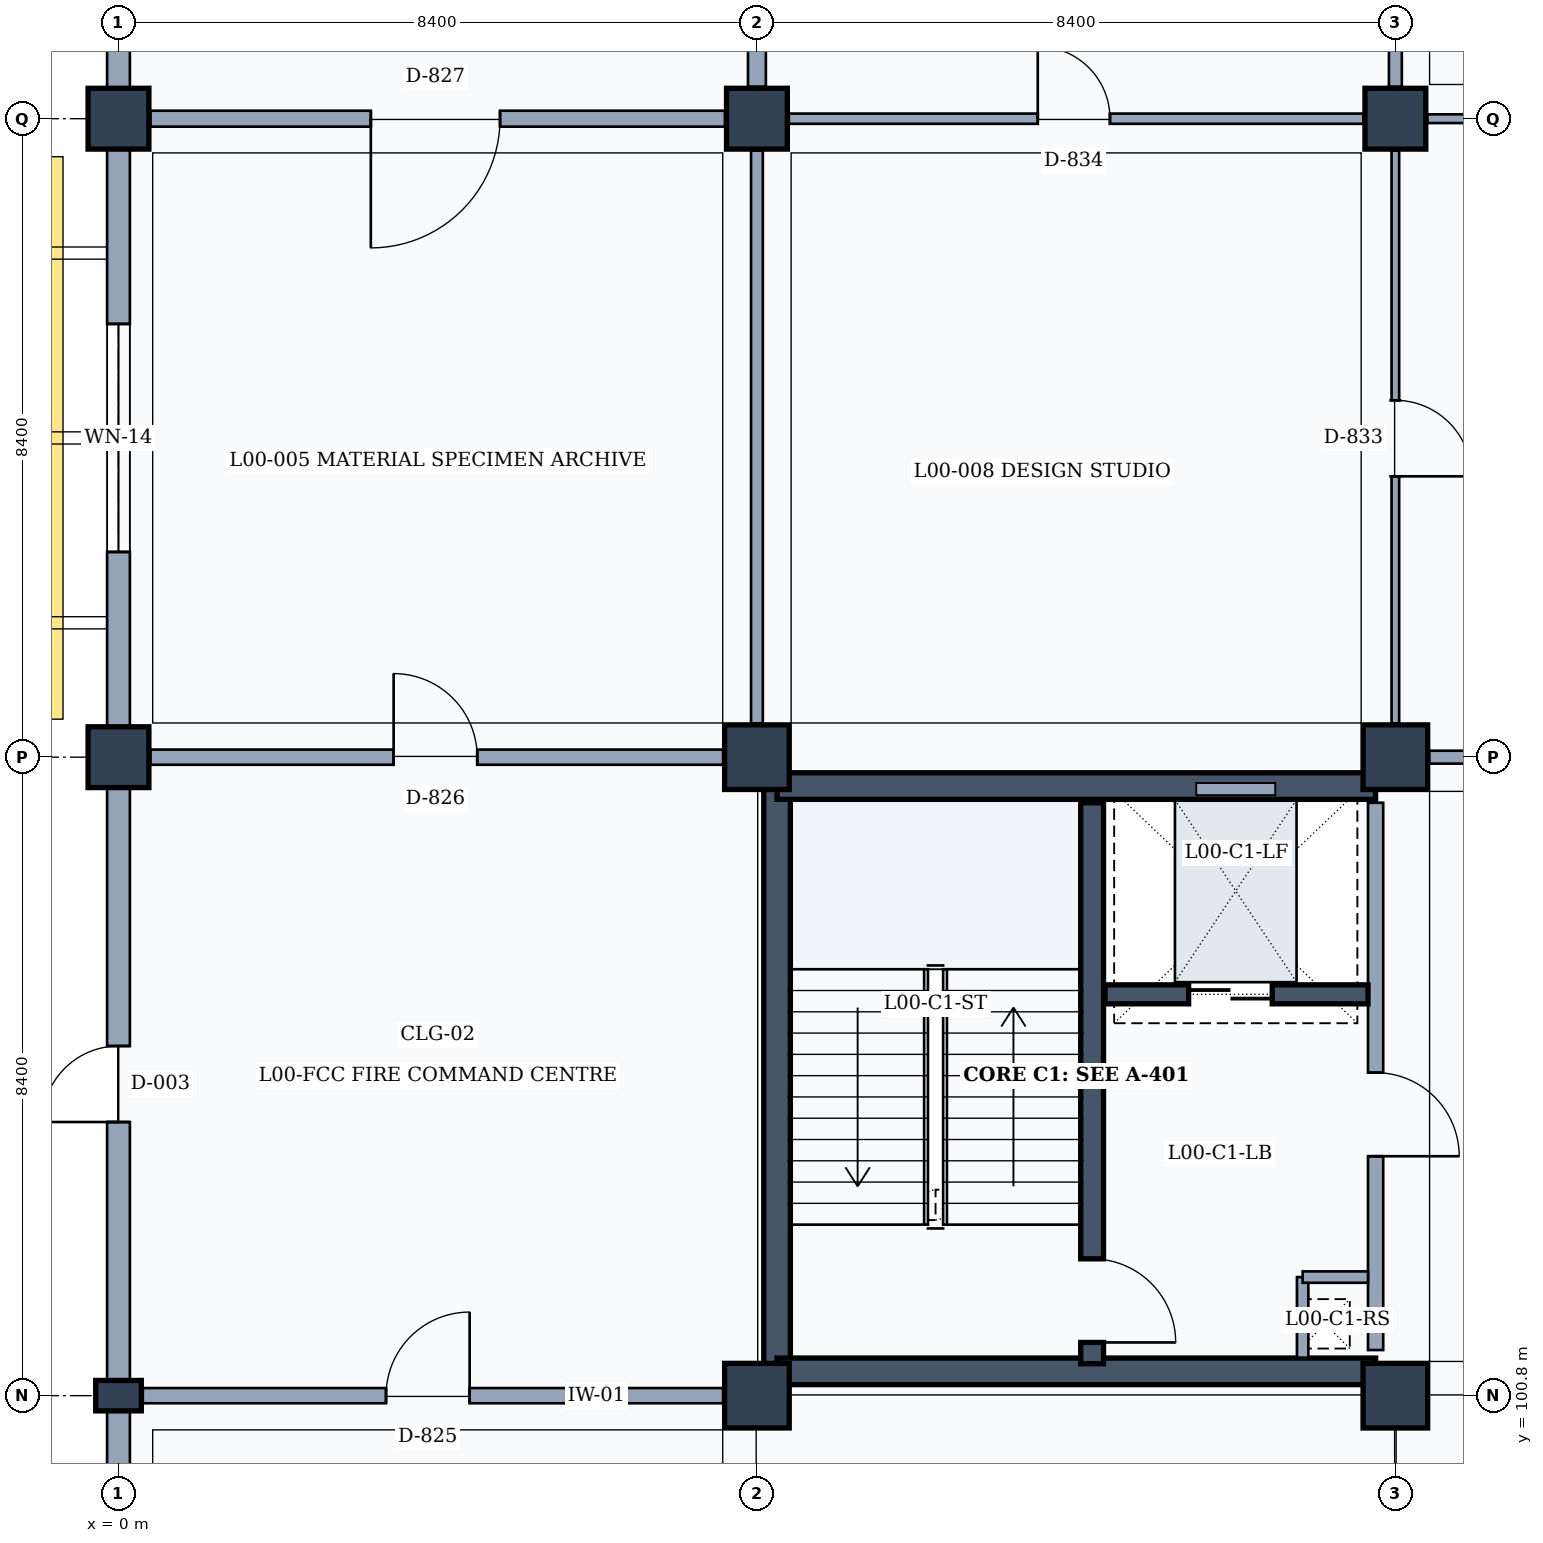
"""IFC4 building model, lengths in metres.
Left out: names, types, materials, properties, quantities, classifications, styles, units other than length and angle.
Written with IfcOpenShell. Run it as: python <this file> out.ifc"""

import sys

from ifc_helpers import new_model, si_unit, direction, frame, frame_2d, origin, origin_2d, place, context, subcontext, project, spatial, rectangle, extrude, element, fill, save


model = new_model("IFC4")
c1 = context("Model", 3, precision=1e-05, world=origin(), true_north=direction((0.0, 1.0)))
c2 = subcontext(c1, "Body", "Model", "MODEL_VIEW")
j1 = project(units=[si_unit("LENGTHUNIT", "METRE"), si_unit("PLANEANGLEUNIT", "RADIAN")], contexts=[c1])
p1 = place(None, origin())
s1 = spatial("IfcSite", under=j1, at=p1, CompositionType="ELEMENT")
p2 = place(p1, origin())
s2 = spatial("IfcBuilding", under=s1, at=p2, CompositionType="ELEMENT")
p3 = place(p2, origin())
s3 = spatial("IfcBuildingStorey", under=s2, at=p3, CompositionType="ELEMENT", Elevation=0.0)
p4 = place(p3, frame((0.0, 100.8, 0.0), z_axis=(0.0, 0.0, 1.0), x_axis=(1.0, 0.0, 0.0)))
e1 = element("IfcColumn", 1, at=p4, inside=s3, PredefinedType="PILASTER", context=c2, shape_type="SweptSolid", body=[
    extrude(rectangle(XDim=0.6, YDim=0.4, at=origin_2d()), origin(), (0.0, 0.0, 1.0), 4.8),
])
for number, where, z_axis, x_axis in (
    (2, (0.0, 109.2, 0.0), (0.0, 0.0, 1.0), (1.0, 0.0, 0.0)),
    (3, (0.0, 117.6, 0.0), (0.0, 0.0, 1.0), (1.0, 0.0, 0.0)),
):
    element("IfcColumn", number, at=place(p3, frame(where, z_axis=z_axis, x_axis=x_axis)), inside=s3, PredefinedType="COLUMN", context=c2, shape_type="SweptSolid", body=[
        extrude(rectangle(XDim=0.8, YDim=0.8, at=origin_2d()), origin(), (0.0, 0.0, 1.0), 4.8),
    ])
for number, where, z_axis, x_axis in (
    (4, (8.4, 100.8, 0.0), (0.0, 0.0, 1.0), (1.0, 0.0, 0.0)),
    (5, (8.4, 109.2, 0.0), (0.0, 0.0, 1.0), (1.0, 0.0, 0.0)),
):
    element("IfcColumn", number, at=place(p3, frame(where, z_axis=z_axis, x_axis=x_axis)), inside=s3, PredefinedType="COLUMN", context=c2, shape_type="SweptSolid", body=[
        extrude(rectangle(XDim=0.85, YDim=0.85, at=origin_2d()), origin(), (0.0, 0.0, 1.0), 4.8),
    ])
p5 = place(p3, frame((8.4, 117.6, 0.0), z_axis=(0.0, 0.0, 1.0), x_axis=(1.0, 0.0, 0.0)))
e6 = element("IfcColumn", 6, at=p5, inside=s3, PredefinedType="COLUMN", context=c2, shape_type="SweptSolid", body=[
    extrude(rectangle(XDim=0.8, YDim=0.8, at=origin_2d()), origin(), (0.0, 0.0, 1.0), 4.8),
])
for number, where, z_axis, x_axis in (
    (7, (16.8, 100.8, 0.0), (0.0, 0.0, 1.0), (1.0, 0.0, 0.0)),
    (8, (16.8, 109.2, 0.0), (0.0, 0.0, 1.0), (1.0, 0.0, 0.0)),
):
    element("IfcColumn", number, at=place(p3, frame(where, z_axis=z_axis, x_axis=x_axis)), inside=s3, PredefinedType="COLUMN", context=c2, shape_type="SweptSolid", body=[
        extrude(rectangle(XDim=0.85, YDim=0.85, at=origin_2d()), origin(), (0.0, 0.0, 1.0), 4.8),
    ])
p6 = place(p3, frame((16.8, 117.6, 0.0), z_axis=(0.0, 0.0, 1.0), x_axis=(1.0, 0.0, 0.0)))
e9 = element("IfcColumn", 9, at=p6, inside=s3, PredefinedType="COLUMN", context=c2, shape_type="SweptSolid", body=[
    extrude(rectangle(XDim=0.8, YDim=0.8, at=origin_2d()), origin(), (0.0, 0.0, 1.0), 4.8),
])
p7 = place(p3, frame((0.0, 92.8, 0.0), z_axis=(0.0, 0.0, 1.0), x_axis=(0.0, 1.0, 0.0)))
e10 = element("IfcWall", 10, at=p7, inside=s3, PredefinedType="SOLIDWALL", context=c2, shape_type="SweptSolid", body=[
    extrude(rectangle(XDim=7.8, YDim=0.3, at=frame_2d((3.9, 0.0))), origin(), (0.0, 0.0, 1.0), 3.96),
])
p8 = place(p7, frame((3.0, 0.0, 0.0)))
e11 = element("IfcOpeningElement", 11, at=p8, cuts=e10, PredefinedType="OPENING", context=c2, shape_type="SweptSolid", body=[
    extrude(rectangle(XDim=1.8, YDim=2.2, at=frame_2d((0.9, 1.1))), frame((0.0, 0.16, 0.0), z_axis=(0.0, -1.0, 0.0), x_axis=(1.0, 0.0, 0.0)), (0.0, 0.0, 1.0), 0.32),
])
p9 = place(p3, frame((0.0, 101.0, 0.0), z_axis=(0.0, 0.0, 1.0), x_axis=(0.0, 1.0, 0.0)))
e12 = element("IfcWall", 12, at=p9, inside=s3, PredefinedType="SOLIDWALL", context=c2, shape_type="SweptSolid", body=[
    extrude(rectangle(XDim=7.8, YDim=0.3, at=frame_2d((3.9, 0.0))), origin(), (0.0, 0.0, 1.0), 3.96),
])
p10 = place(p9, frame((3.4, 0.0, 0.0)))
e13 = element("IfcOpeningElement", 13, at=p10, cuts=e12, PredefinedType="OPENING", context=c2, shape_type="SweptSolid", body=[
    extrude(rectangle(XDim=1.0, YDim=2.15, at=frame_2d((0.5, 1.075))), frame((0.0, 0.16, 0.0), z_axis=(0.0, -1.0, 0.0), x_axis=(1.0, 0.0, 0.0)), (0.0, 0.0, 1.0), 0.32),
])
p11 = place(p3, frame((0.0, 109.6, 0.0), z_axis=(0.0, 0.0, 1.0), x_axis=(0.0, 1.0, 0.0)))
e14 = element("IfcWall", 14, at=p11, inside=s3, PredefinedType="SOLIDWALL", context=c2, shape_type="SweptSolid", body=[
    extrude(rectangle(XDim=7.6, YDim=0.3, at=frame_2d((3.8, 0.0))), origin(), (0.0, 0.0, 1.0), 3.96),
])
p12 = place(p11, frame((2.3, 0.0, 0.95)))
e15 = element("IfcOpeningElement", 15, at=p12, cuts=e14, PredefinedType="OPENING", context=c2, shape_type="SweptSolid", body=[
    extrude(rectangle(XDim=3.0, YDim=1.8, at=frame_2d((1.5, 0.9))), frame((0.0, 0.16, 0.0), z_axis=(0.0, -1.0, 0.0), x_axis=(1.0, 0.0, 0.0)), (0.0, 0.0, 1.0), 0.32),
])
p13 = place(p3, frame((0.0, 118.0, 0.0), z_axis=(0.0, 0.0, 1.0), x_axis=(0.0, 1.0, 0.0)))
e16 = element("IfcWall", 16, at=p13, inside=s3, PredefinedType="SOLIDWALL", context=c2, shape_type="SweptSolid", body=[
    extrude(rectangle(XDim=7.8, YDim=0.3, at=frame_2d((3.9, 0.0))), origin(), (0.0, 0.0, 1.0), 3.96),
])
p14 = place(p3, frame((8.665, 101.05, 0.0), z_axis=(0.0, 0.0, 1.0), x_axis=(0.0, 1.0, 0.0)))
e17 = element("IfcWall", 17, at=p14, inside=s3, PredefinedType="SHEAR", context=c2, shape_type="SweptSolid", body=[
    extrude(rectangle(XDim=7.94, YDim=0.35, at=frame_2d((3.97, 0.0))), origin(), (0.0, 0.0, 1.0), 4.55),
])
p15 = place(p3, frame((8.665, 108.82, 0.0), z_axis=(0.0, 0.0, 1.0), x_axis=(1.0, 0.0, 0.0)))
e18 = element("IfcWall", 18, at=p15, inside=s3, PredefinedType="SHEAR", context=c2, shape_type="SweptSolid", body=[
    extrude(rectangle(XDim=7.875, YDim=0.35, at=frame_2d((3.938, 0.0))), origin(), (0.0, 0.0, 1.0), 4.55),
])
p16 = place(p3, frame((16.54, 108.6, 0.0), z_axis=(0.0, 0.0, 1.0), x_axis=(0.0, -1.0, 0.0)))
e19 = element("IfcWall", 19, at=p16, inside=s3, PredefinedType="PARTITIONING", context=c2, shape_type="SweptSolid", body=[
    extrude(rectangle(XDim=7.2, YDim=0.2, at=frame_2d((3.6, 0.0))), origin(), (0.0, 0.0, 1.0), 3.92),
])
p17 = place(p16, frame((3.55, 0.0, 0.0)))
e20 = element("IfcOpeningElement", 20, at=p17, cuts=e19, PredefinedType="OPENING", context=c2, shape_type="SweptSolid", body=[
    extrude(rectangle(XDim=1.1, YDim=2.15, at=frame_2d((0.55, 1.075))), frame((0.0, 0.11, 0.0), z_axis=(0.0, -1.0, 0.0), x_axis=(1.0, 0.0, 0.0)), (0.0, 0.0, 1.0), 0.22),
])
p18 = place(p3, frame((16.54, 101.12, 0.0), z_axis=(0.0, 0.0, 1.0), x_axis=(-1.0, 0.0, 0.0)))
e21 = element("IfcWall", 21, at=p18, inside=s3, PredefinedType="SHEAR", context=c2, shape_type="SweptSolid", body=[
    extrude(rectangle(XDim=7.875, YDim=0.35, at=frame_2d((3.938, 0.0))), origin(), (0.0, 0.0, 1.0), 4.55),
])
p19 = place(p3, frame((12.81, 101.22, 0.0), z_axis=(0.0, 0.0, 1.0), x_axis=(0.0, 1.0, 0.0)))
e22 = element("IfcWall", 22, at=p19, inside=s3, PredefinedType="SHEAR", context=c2, shape_type="SweptSolid", body=[
    extrude(rectangle(XDim=7.38, YDim=0.3, at=frame_2d((3.69, 0.0))), origin(), (0.0, 0.0, 1.0), 4.55),
])
p20 = place(p19, frame((0.28, 0.0, 0.0)))
e23 = element("IfcOpeningElement", 23, at=p20, cuts=e22, PredefinedType="OPENING", context=c2, shape_type="SweptSolid", body=[
    extrude(rectangle(XDim=1.1, YDim=2.15, at=frame_2d((0.55, 1.075))), frame((0.0, 0.16, 0.0), z_axis=(0.0, -1.0, 0.0), x_axis=(1.0, 0.0, 0.0)), (0.0, 0.0, 1.0), 0.32),
])
p21 = place(p3, frame((15.58, 102.36, 0.0), z_axis=(0.0, 0.0, 1.0), x_axis=(0.0, -1.0, 0.0)))
e24 = element("IfcWall", 24, at=p21, inside=s3, PredefinedType="PARTITIONING", context=c2, shape_type="SweptSolid", body=[
    extrude(rectangle(XDim=1.06, YDim=0.15, at=frame_2d((0.53, 0.0))), origin(), (0.0, 0.0, 1.0), 3.92),
])
p22 = place(p3, frame((15.58, 102.36, 0.0), z_axis=(0.0, 0.0, 1.0), x_axis=(1.0, 0.0, 0.0)))
e25 = element("IfcWall", 25, at=p22, inside=s3, PredefinedType="PARTITIONING", context=c2, shape_type="SweptSolid", body=[
    extrude(rectangle(XDim=0.86, YDim=0.15, at=frame_2d((0.43, 0.0))), origin(), (0.0, 0.0, 1.0), 3.92),
])
p23 = place(p3, frame((12.98, 106.08, 0.0), z_axis=(0.0, 0.0, 1.0), x_axis=(1.0, 0.0, 0.0)))
e26 = element("IfcWall", 26, at=p23, inside=s3, PredefinedType="SHEAR", context=c2, shape_type="SweptSolid", body=[
    extrude(rectangle(XDim=3.46, YDim=0.25, at=frame_2d((1.73, 0.0))), origin(), (0.0, 0.0, 1.0), 4.55),
])
p24 = place(p23, frame((1.1, 0.0, 0.0)))
e27 = element("IfcOpeningElement", 27, at=p24, cuts=e26, PredefinedType="OPENING", context=c2, shape_type="SweptSolid", body=[
    extrude(rectangle(XDim=1.1, YDim=2.15, at=frame_2d((0.55, 1.075))), frame((0.0, 0.135, 0.0), z_axis=(0.0, -1.0, 0.0), x_axis=(1.0, 0.0, 0.0)), (0.0, 0.0, 1.0), 0.27),
])
p25 = place(p3, frame((0.32, 100.8, 0.0), z_axis=(0.0, 0.0, 1.0), x_axis=(1.0, 0.0, 0.0)))
e28 = element("IfcWall", 28, at=p25, inside=s3, PredefinedType="PARTITIONING", context=c2, shape_type="SweptSolid", body=[
    extrude(rectangle(XDim=7.635, YDim=0.2, at=frame_2d((3.817, 0.0))), origin(), (0.0, 0.0, 1.0), 3.87),
])
p26 = place(p25, frame((3.2, 0.0, 0.0)))
e29 = element("IfcOpeningElement", 29, at=p26, cuts=e28, PredefinedType="OPENING", context=c2, shape_type="SweptSolid", body=[
    extrude(rectangle(XDim=1.1, YDim=2.15, at=frame_2d((0.55, 1.075))), frame((0.0, 0.11, 0.0), z_axis=(0.0, -1.0, 0.0), x_axis=(1.0, 0.0, 0.0)), (0.0, 0.0, 1.0), 0.22),
])
p27 = place(p3, frame((0.42, 109.2, 0.0), z_axis=(0.0, 0.0, 1.0), x_axis=(1.0, 0.0, 0.0)))
e30 = element("IfcWall", 30, at=p27, inside=s3, PredefinedType="PARTITIONING", context=c2, shape_type="SweptSolid", body=[
    extrude(rectangle(XDim=7.535, YDim=0.2, at=frame_2d((3.768, 0.0))), origin(), (0.0, 0.0, 1.0), 3.87),
])
p28 = place(p27, frame((3.2, 0.0, 0.0)))
e31 = element("IfcOpeningElement", 31, at=p28, cuts=e30, PredefinedType="OPENING", context=c2, shape_type="SweptSolid", body=[
    extrude(rectangle(XDim=1.1, YDim=2.15, at=frame_2d((0.55, 1.075))), frame((0.0, 0.11, 0.0), z_axis=(0.0, -1.0, 0.0), x_axis=(1.0, 0.0, 0.0)), (0.0, 0.0, 1.0), 0.22),
])
p29 = place(p3, frame((8.4, 109.645, 0.0), z_axis=(0.0, 0.0, 1.0), x_axis=(0.0, 1.0, 0.0)))
e32 = element("IfcWall", 32, at=p29, inside=s3, PredefinedType="PARTITIONING", context=c2, shape_type="SweptSolid", body=[
    extrude(rectangle(XDim=7.535, YDim=0.155, at=frame_2d((3.768, 0.0))), origin(), (0.0, 0.0, 1.0), 3.92),
])
p30 = place(p3, frame((0.42, 117.6, 0.0), z_axis=(0.0, 0.0, 1.0), x_axis=(1.0, 0.0, 0.0)))
e33 = element("IfcWall", 33, at=p30, inside=s3, PredefinedType="PARTITIONING", context=c2, shape_type="SweptSolid", body=[
    extrude(rectangle(XDim=7.56, YDim=0.21, at=frame_2d((3.78, 0.0))), origin(), (0.0, 0.0, 1.0), 3.87),
])
p31 = place(p30, frame((2.9, 0.0, 0.0)))
e34 = element("IfcOpeningElement", 34, at=p31, cuts=e33, PredefinedType="OPENING", context=c2, shape_type="SweptSolid", body=[
    extrude(rectangle(XDim=1.7, YDim=2.3, at=frame_2d((0.85, 1.15))), frame((0.0, 0.115, 0.0), z_axis=(0.0, -1.0, 0.0), x_axis=(1.0, 0.0, 0.0)), (0.0, 0.0, 1.0), 0.23),
])
p32 = place(p3, frame((8.4, 118.02, 0.0), z_axis=(0.0, 0.0, 1.0), x_axis=(0.0, 1.0, 0.0)))
e35 = element("IfcWall", 35, at=p32, inside=s3, PredefinedType="PARTITIONING", context=c2, shape_type="SweptSolid", body=[
    extrude(rectangle(XDim=7.56, YDim=0.235, at=frame_2d((3.78, 0.0))), origin(), (0.0, 0.0, 1.0), 3.92),
])
p33 = place(p3, frame((16.8, 109.645, 0.0), z_axis=(0.0, 0.0, 1.0), x_axis=(0.0, 1.0, 0.0)))
e36 = element("IfcWall", 36, at=p33, inside=s3, PredefinedType="MOVABLE", context=c2, shape_type="SweptSolid", body=[
    extrude(rectangle(XDim=7.535, YDim=0.1, at=frame_2d((3.768, 0.0))), origin(), (0.0, 0.0, 1.0), 3.92),
])
p34 = place(p33, frame((3.25, 0.0, 0.0)))
e37 = element("IfcOpeningElement", 37, at=p34, cuts=e36, PredefinedType="OPENING", context=c2, shape_type="SweptSolid", body=[
    extrude(rectangle(XDim=1.0, YDim=2.15, at=frame_2d((0.5, 1.075))), frame((0.0, 0.06, 0.0), z_axis=(0.0, -1.0, 0.0), x_axis=(1.0, 0.0, 0.0)), (0.0, 0.0, 1.0), 0.12),
])
p35 = place(p3, frame((8.82, 117.6, 0.0), z_axis=(0.0, 0.0, 1.0), x_axis=(1.0, 0.0, 0.0)))
e38 = element("IfcWall", 38, at=p35, inside=s3, PredefinedType="PARTITIONING", context=c2, shape_type="SweptSolid", body=[
    extrude(rectangle(XDim=7.56, YDim=0.135, at=frame_2d((3.78, 0.0))), origin(), (0.0, 0.0, 1.0), 3.87),
])
p36 = place(p35, frame((3.275, 0.0, 0.0)))
e39 = element("IfcOpeningElement", 39, at=p36, cuts=e38, PredefinedType="OPENING", context=c2, shape_type="SweptSolid", body=[
    extrude(rectangle(XDim=0.95, YDim=2.15, at=frame_2d((0.475, 1.075))), frame((0.0, 0.077, 0.0), z_axis=(0.0, -1.0, 0.0), x_axis=(1.0, 0.0, 0.0)), (0.0, 0.0, 1.0), 0.155),
])
p37 = place(p3, frame((16.8, 118.02, 0.0), z_axis=(0.0, 0.0, 1.0), x_axis=(0.0, 1.0, 0.0)))
e40 = element("IfcWall", 40, at=p37, inside=s3, PredefinedType="PARTITIONING", context=c2, shape_type="SweptSolid", body=[
    extrude(rectangle(XDim=7.56, YDim=0.17, at=frame_2d((3.78, 0.0))), origin(), (0.0, 0.0, 1.0), 3.92),
])
p38 = place(p3, frame((17.245, 109.2, 0.0), z_axis=(0.0, 0.0, 1.0), x_axis=(1.0, 0.0, 0.0)))
e41 = element("IfcWall", 41, at=p38, inside=s3, PredefinedType="PARTITIONING", context=c2, shape_type="SweptSolid", body=[
    extrude(rectangle(XDim=7.535, YDim=0.17, at=frame_2d((3.768, 0.0))), origin(), (0.0, 0.0, 1.0), 3.87),
])
p39 = place(p38, frame((2.9, 0.0, 0.0)))
e42 = element("IfcOpeningElement", 42, at=p39, cuts=e41, PredefinedType="OPENING", context=c2, shape_type="SweptSolid", body=[
    extrude(rectangle(XDim=1.7, YDim=2.3, at=frame_2d((0.85, 1.15))), frame((0.0, 0.095, 0.0), z_axis=(0.0, -1.0, 0.0), x_axis=(1.0, 0.0, 0.0)), (0.0, 0.0, 1.0), 0.19),
])
p40 = place(p3, frame((17.22, 117.6, 0.0), z_axis=(0.0, 0.0, 1.0), x_axis=(1.0, 0.0, 0.0)))
e43 = element("IfcWall", 43, at=p40, inside=s3, PredefinedType="PARTITIONING", context=c2, shape_type="SweptSolid", body=[
    extrude(rectangle(XDim=7.56, YDim=0.115, at=frame_2d((3.78, 0.0))), origin(), (0.0, 0.0, 1.0), 3.87),
])
p41 = place(p40, frame((2.8, 0.0, 0.0)))
e44 = element("IfcOpeningElement", 44, at=p41, cuts=e43, PredefinedType="OPENING", context=c2, shape_type="SweptSolid", body=[
    extrude(rectangle(XDim=1.9, YDim=2.4, at=frame_2d((0.95, 1.2))), frame((0.0, 0.067, 0.0), z_axis=(0.0, -1.0, 0.0), x_axis=(1.0, 0.0, 0.0)), (0.0, 0.0, 1.0), 0.135),
])
p42 = place(p10, origin())
e45 = element("IfcDoor", 45, at=p42, inside=s3, OperationType="SINGLE_SWING_LEFT", PredefinedType="DOOR", context=c2, shape_type="SweptSolid", body=[
    extrude(rectangle(XDim=1.0, YDim=2.15, at=frame_2d((0.5, 1.075))), frame((0.0, 0.025, 0.0), z_axis=(0.0, -1.0, 0.0), x_axis=(1.0, 0.0, 0.0)), (0.0, 0.0, 1.0), 0.05),
])
fill(e13, e45)
p43 = place(p12, origin())
e46 = element("IfcWindow", 46, at=p43, inside=s3, PartitioningType="SINGLE_PANEL", PredefinedType="WINDOW", context=c2, shape_type="SweptSolid", body=[
    extrude(rectangle(XDim=3.0, YDim=1.8, at=frame_2d((1.5, 0.9))), frame((0.0, 0.03, 0.0), z_axis=(0.0, -1.0, 0.0), x_axis=(1.0, 0.0, 0.0)), (0.0, 0.0, 1.0), 0.06),
])
fill(e15, e46)
p44 = place(p17, origin())
e47 = element("IfcDoor", 47, at=p44, inside=s3, OperationType="SINGLE_SWING_RIGHT", PredefinedType="DOOR", context=c2, shape_type="SweptSolid", body=[
    extrude(rectangle(XDim=1.1, YDim=2.15, at=frame_2d((0.55, 1.075))), frame((0.0, 0.025, 0.0), z_axis=(0.0, -1.0, 0.0), x_axis=(1.0, 0.0, 0.0)), (0.0, 0.0, 1.0), 0.05),
])
fill(e20, e47)
p45 = place(p20, frame((1.1, 0.0, 0.0), z_axis=(0.0, 0.0, 1.0), x_axis=(-1.0, 0.0, 0.0)))
e48 = element("IfcDoor", 48, at=p45, inside=s3, OperationType="SINGLE_SWING_RIGHT", PredefinedType="DOOR", context=c2, shape_type="SweptSolid", body=[
    extrude(rectangle(XDim=1.1, YDim=2.15, at=frame_2d((0.55, 1.075))), frame((0.0, 0.025, 0.0), z_axis=(0.0, -1.0, 0.0), x_axis=(1.0, 0.0, 0.0)), (0.0, 0.0, 1.0), 0.05),
])
fill(e23, e48)
p46 = place(p24, origin())
e49 = element("IfcDoor", 49, at=p46, inside=s3, OperationType="DOUBLE_DOOR_SLIDING", PredefinedType="DOOR", context=c2, shape_type="SweptSolid", body=[
    extrude(rectangle(XDim=1.1, YDim=2.15, at=frame_2d((0.55, 1.075))), frame((0.0, 0.025, 0.0), z_axis=(0.0, -1.0, 0.0), x_axis=(1.0, 0.0, 0.0)), (0.0, 0.0, 1.0), 0.05),
])
fill(e27, e49)
p47 = place(p26, origin())
e50 = element("IfcDoor", 50, at=p47, inside=s3, OperationType="SINGLE_SWING_RIGHT", PredefinedType="DOOR", context=c2, shape_type="SweptSolid", body=[
    extrude(rectangle(XDim=1.1, YDim=2.15, at=frame_2d((0.55, 1.075))), frame((0.0, 0.025, 0.0), z_axis=(0.0, -1.0, 0.0), x_axis=(1.0, 0.0, 0.0)), (0.0, 0.0, 1.0), 0.05),
])
fill(e29, e50)
p48 = place(p28, origin())
e51 = element("IfcDoor", 51, at=p48, inside=s3, OperationType="SINGLE_SWING_LEFT", PredefinedType="DOOR", context=c2, shape_type="SweptSolid", body=[
    extrude(rectangle(XDim=1.1, YDim=2.15, at=frame_2d((0.55, 1.075))), frame((0.0, 0.025, 0.0), z_axis=(0.0, -1.0, 0.0), x_axis=(1.0, 0.0, 0.0)), (0.0, 0.0, 1.0), 0.05),
])
fill(e31, e51)
p49 = place(p31, frame((1.7, 0.0, 0.0), z_axis=(0.0, 0.0, 1.0), x_axis=(-1.0, 0.0, 0.0)))
e52 = element("IfcDoor", 52, at=p49, inside=s3, OperationType="SINGLE_SWING_RIGHT", PredefinedType="DOOR", context=c2, shape_type="SweptSolid", body=[
    extrude(rectangle(XDim=1.7, YDim=2.3, at=frame_2d((0.85, 1.15))), frame((0.0, 0.025, 0.0), z_axis=(0.0, -1.0, 0.0), x_axis=(1.0, 0.0, 0.0)), (0.0, 0.0, 1.0), 0.05),
])
fill(e34, e52)
p50 = place(p34, frame((1.0, 0.0, 0.0), z_axis=(0.0, 0.0, 1.0), x_axis=(-1.0, 0.0, 0.0)))
e53 = element("IfcDoor", 53, at=p50, inside=s3, OperationType="SINGLE_SWING_RIGHT", PredefinedType="DOOR", context=c2, shape_type="SweptSolid", body=[
    extrude(rectangle(XDim=1.0, YDim=2.15, at=frame_2d((0.5, 1.075))), frame((0.0, 0.025, 0.0), z_axis=(0.0, -1.0, 0.0), x_axis=(1.0, 0.0, 0.0)), (0.0, 0.0, 1.0), 0.05),
])
fill(e37, e53)
p51 = place(p36, origin())
e54 = element("IfcDoor", 54, at=p51, inside=s3, OperationType="SINGLE_SWING_LEFT", PredefinedType="DOOR", context=c2, shape_type="SweptSolid", body=[
    extrude(rectangle(XDim=0.95, YDim=2.15, at=frame_2d((0.475, 1.075))), frame((0.0, 0.025, 0.0), z_axis=(0.0, -1.0, 0.0), x_axis=(1.0, 0.0, 0.0)), (0.0, 0.0, 1.0), 0.05),
])
fill(e39, e54)
save(model, sys.argv[1])
